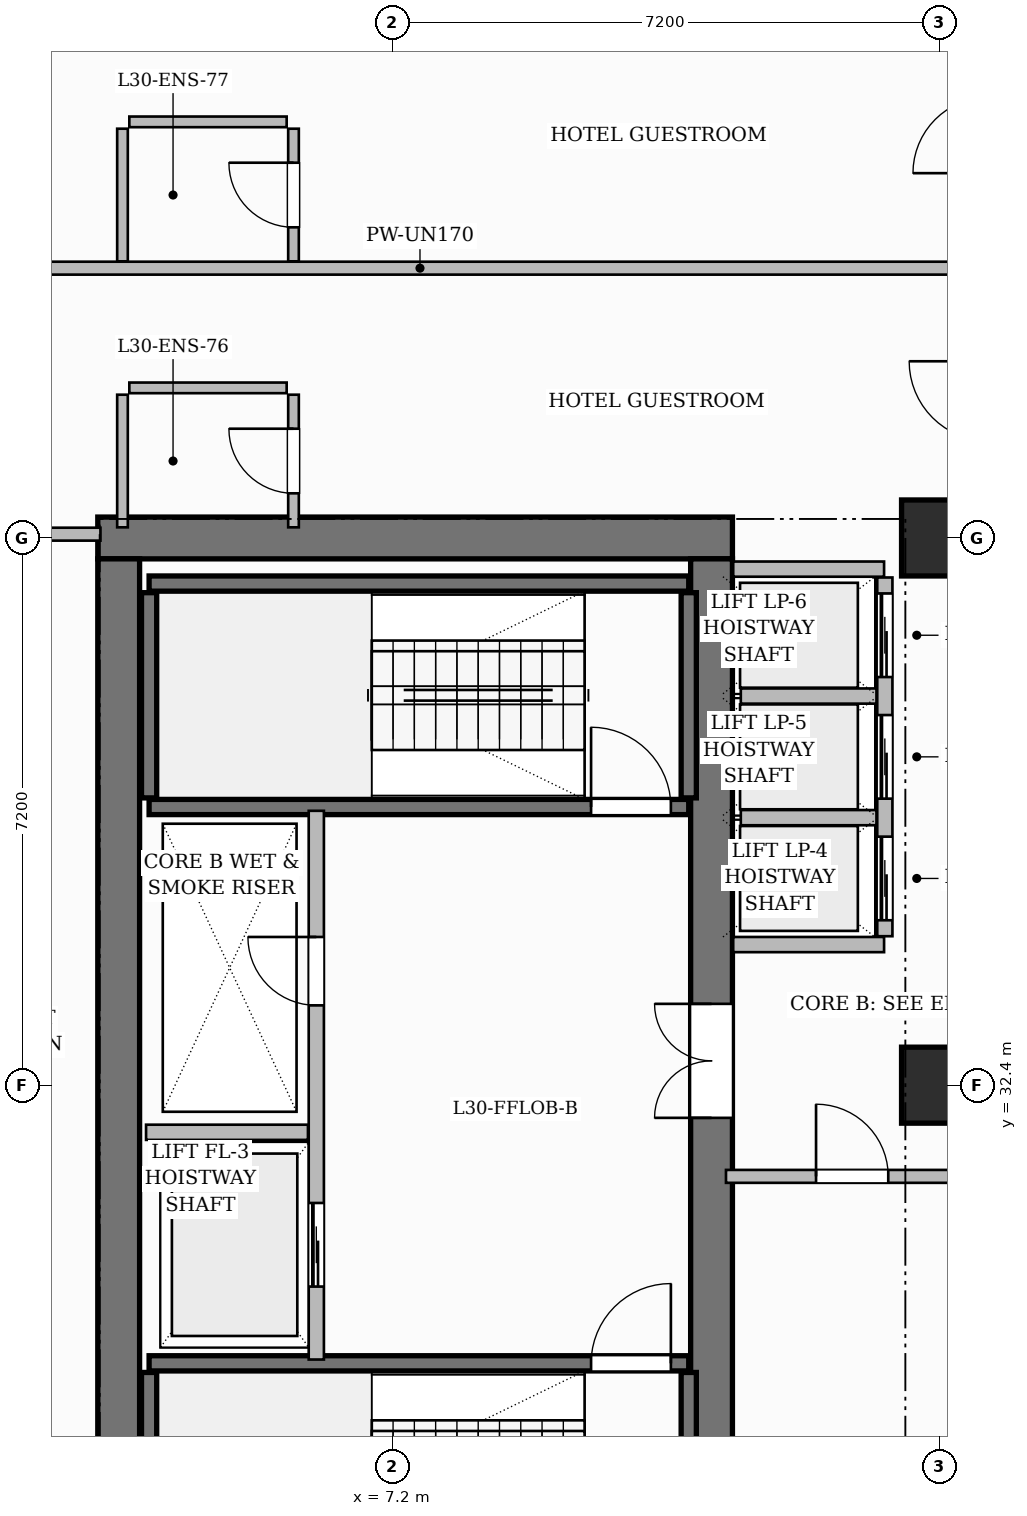
"""IFC4 building model, lengths in metres.
Left out: names, types, materials, properties, quantities, classifications, styles, units other than length and angle.
Written with IfcOpenShell. Run it as: python <this file> out.ifc"""

import sys

from ifc_helpers import new_model, si_unit, direction, frame, frame_2d, origin, origin_2d, place, context, subcontext, project, spatial, rectangle, extrude, source, transform, mapped, element, fill, save


model = new_model("IFC4")
c1 = context("Model", 3, precision=1e-05, world=origin(), true_north=direction((0.0, 1.0)))
c2 = subcontext(c1, "Body", "Model", "MODEL_VIEW")
j1 = project(units=[si_unit("LENGTHUNIT", "METRE"), si_unit("PLANEANGLEUNIT", "RADIAN")], contexts=[c1])
p1 = place(None, origin())
s1 = spatial("IfcSite", under=j1, at=p1, CompositionType="ELEMENT")
p2 = place(p1, origin())
s2 = spatial("IfcBuilding", under=s1, at=p2, CompositionType="ELEMENT")
p3 = place(p2, frame((0.0, 0.0, 122.9)))
s3 = spatial("IfcBuildingStorey", under=s2, at=p3, CompositionType="ELEMENT", Elevation=122.9)
p4 = place(p3, frame((3.325, 39.6, 0.0), z_axis=(0.0, 0.0, 1.0), x_axis=(1.0, 0.0, 0.0)))
e1 = element("IfcWall", 1, at=p4, inside=s3, PredefinedType="SHEAR", context=c2, shape_type="SweptSolid", body=[
    extrude(rectangle(XDim=8.35, YDim=0.55, at=frame_2d((4.175, 0.0))), origin(), (0.0, 0.0, 1.0), 3.7),
])
p5 = place(p3, frame((3.6, 25.475, 0.0), z_axis=(0.0, 0.0, 1.0), x_axis=(0.0, 1.0, 0.0)))
e2 = element("IfcWall", 2, at=p5, inside=s3, PredefinedType="SHEAR", context=c2, shape_type="SweptSolid", body=[
    extrude(rectangle(XDim=13.85, YDim=0.55, at=frame_2d((6.925, 0.0))), origin(), (0.0, 0.0, 1.0), 3.7),
])
p6 = place(p3, frame((11.4, 25.475, 0.0), z_axis=(0.0, 0.0, 1.0), x_axis=(0.0, 1.0, 0.0)))
e3 = element("IfcWall", 3, at=p6, inside=s3, PredefinedType="SHEAR", context=c2, shape_type="SweptSolid", body=[
    extrude(rectangle(XDim=13.85, YDim=0.55, at=frame_2d((6.925, 0.0))), origin(), (0.0, 0.0, 1.0), 3.7),
])
p7 = place(p6, frame((6.495, 0.0, 0.0)))
e4 = element("IfcOpeningElement", 4, at=p7, cuts=e3, PredefinedType="OPENING", context=c2, shape_type="SweptSolid", body=[
    extrude(rectangle(XDim=1.5, YDim=2.2, at=frame_2d((0.75, 1.1))), frame((0.0, 0.285, 0.0), z_axis=(0.0, -1.0, 0.0), x_axis=(1.0, 0.0, 0.0)), (0.0, 0.0, 1.0), 0.57),
])
m1 = source(origin(), c2, "Body", "SweptSolid", [
    extrude(rectangle(XDim=1.0, YDim=1.0, at=origin_2d()), origin(), (0.0, 0.0, 1.0), 3.7),
])
for number, where, z_axis, x_axis in (
    (5, (14.4, 32.4, 0.0), (0.0, 0.0, 1.0), (1.0, 0.0, 0.0)),
    (6, (14.4, 39.6, 0.0), (0.0, 0.0, 1.0), (1.0, 0.0, 0.0)),
):
    element("IfcColumn", number, at=place(p3, frame(where, z_axis=z_axis, x_axis=x_axis)), inside=s3, PredefinedType="COLUMN", context=c2, shape_type="MappedRepresentation", body=[
        mapped(m1, transform((0.0, 0.0, 0.0), scale=1.0)),
    ])
for number, where, z_axis, x_axis in (
    (7, (4.0, 25.92, 0.0), (0.0, 0.0, 1.0), (0.0, 1.0, 0.0)),
    (8, (11.1, 25.92, 0.0), (0.0, 0.0, 1.0), (0.0, 1.0, 0.0)),
):
    element("IfcWall", number, at=place(p3, frame(where, z_axis=z_axis, x_axis=x_axis)), inside=s3, PredefinedType="SHEAR", context=c2, shape_type="SweptSolid", body=[
        extrude(rectangle(XDim=2.7, YDim=0.2, at=frame_2d((1.35, 0.0))), origin(), (0.0, 0.0, 1.0), 3.7),
    ])
p8 = place(p3, frame((4.0, 28.74, 0.0), z_axis=(0.0, 0.0, 1.0), x_axis=(1.0, 0.0, 0.0)))
e9 = element("IfcWall", 9, at=p8, inside=s3, PredefinedType="SHEAR", context=c2, shape_type="SweptSolid", body=[
    extrude(rectangle(XDim=7.1, YDim=0.2, at=frame_2d((3.55, 0.0))), origin(), (0.0, 0.0, 1.0), 3.7),
])
p9 = place(p8, frame((5.815, 0.0, 0.0)))
e10 = element("IfcOpeningElement", 10, at=p9, cuts=e9, PredefinedType="OPENING", context=c2, shape_type="SweptSolid", body=[
    extrude(rectangle(XDim=1.05, YDim=2.2, at=frame_2d((0.525, 1.1))), frame((0.0, 0.11, 0.0), z_axis=(0.0, -1.0, 0.0), x_axis=(1.0, 0.0, 0.0)), (0.0, 0.0, 1.0), 0.22),
])
p10 = place(p3, frame((4.0, 39.0, 0.0), z_axis=(0.0, 0.0, 1.0), x_axis=(1.0, 0.0, 0.0)))
e11 = element("IfcWall", 11, at=p10, inside=s3, PredefinedType="SHEAR", context=c2, shape_type="SweptSolid", body=[
    extrude(rectangle(XDim=7.1, YDim=0.2, at=frame_2d((3.55, 0.0))), origin(), (0.0, 0.0, 1.0), 3.7),
])
for number, where, z_axis, x_axis in (
    (12, (4.0, 36.18, 0.0), (0.0, 0.0, 1.0), (0.0, 1.0, 0.0)),
    (13, (11.1, 36.18, 0.0), (0.0, 0.0, 1.0), (0.0, 1.0, 0.0)),
):
    element("IfcWall", number, at=place(p3, frame(where, z_axis=z_axis, x_axis=x_axis)), inside=s3, PredefinedType="SHEAR", context=c2, shape_type="SweptSolid", body=[
        extrude(rectangle(XDim=2.7, YDim=0.2, at=frame_2d((1.35, 0.0))), origin(), (0.0, 0.0, 1.0), 3.7),
    ])
p11 = place(p3, frame((4.0, 36.06, 0.0), z_axis=(0.0, 0.0, 1.0), x_axis=(1.0, 0.0, 0.0)))
e14 = element("IfcWall", 14, at=p11, inside=s3, PredefinedType="SHEAR", context=c2, shape_type="SweptSolid", body=[
    extrude(rectangle(XDim=7.1, YDim=0.2, at=frame_2d((3.55, 0.0))), origin(), (0.0, 0.0, 1.0), 3.7),
])
p12 = place(p11, frame((5.815, 0.0, 0.0)))
e15 = element("IfcOpeningElement", 15, at=p12, cuts=e14, PredefinedType="OPENING", context=c2, shape_type="SweptSolid", body=[
    extrude(rectangle(XDim=1.05, YDim=2.2, at=frame_2d((0.525, 1.1))), frame((0.0, 0.11, 0.0), z_axis=(0.0, -1.0, 0.0), x_axis=(1.0, 0.0, 0.0)), (0.0, 0.0, 1.0), 0.22),
])
p13 = place(p3, frame((6.2, 28.79, 0.0), z_axis=(0.0, 0.0, 1.0), x_axis=(0.0, 1.0, 0.0)))
e16 = element("IfcWall", 16, at=p13, inside=s3, PredefinedType="PARTITIONING", context=c2, shape_type="SweptSolid", body=[
    extrude(rectangle(XDim=7.22, YDim=0.2, at=frame_2d((3.61, 0.0))), origin(), (0.0, 0.0, 1.0), 3.45),
])
p14 = place(p13, frame((4.66, 0.0, 0.0)))
e17 = element("IfcOpeningElement", 17, at=p14, cuts=e16, PredefinedType="OPENING", context=c2, shape_type="SweptSolid", body=[
    extrude(rectangle(XDim=0.9, YDim=2.1, at=frame_2d((0.45, 1.05))), frame((0.0, 0.11, 0.0), z_axis=(0.0, -1.0, 0.0), x_axis=(1.0, 0.0, 0.0)), (0.0, 0.0, 1.0), 0.22),
])
p15 = place(p13, frame((0.96, 0.0, 0.0)))
e18 = element("IfcOpeningElement", 18, at=p15, cuts=e16, PredefinedType="OPENING", context=c2, shape_type="SweptSolid", body=[
    extrude(rectangle(XDim=1.1, YDim=2.2, at=frame_2d((0.55, 1.1))), frame((0.0, 0.11, 0.0), z_axis=(0.0, -1.0, 0.0), x_axis=(1.0, 0.0, 0.0)), (0.0, 0.0, 1.0), 0.22),
])
p16 = place(p3, frame((3.96, 31.78, 0.0), z_axis=(0.0, 0.0, 1.0), x_axis=(1.0, 0.0, 0.0)))
e19 = element("IfcWall", 19, at=p16, inside=s3, PredefinedType="PARTITIONING", context=c2, shape_type="SweptSolid", body=[
    extrude(rectangle(XDim=2.13, YDim=0.2, at=frame_2d((1.065, 0.0))), origin(), (0.0, 0.0, 1.0), 3.45),
])
for number, where, z_axis, x_axis in (
    (20, (11.685, 34.25, 0.0), (0.0, 0.0, 1.0), (1.0, 0.0, 0.0)),
    (21, (11.685, 39.19, 0.0), (0.0, 0.0, 1.0), (1.0, 0.0, 0.0)),
):
    element("IfcWall", number, at=place(p3, frame(where, z_axis=z_axis, x_axis=x_axis)), inside=s3, PredefinedType="PARTITIONING", context=c2, shape_type="SweptSolid", body=[
        extrude(rectangle(XDim=1.985, YDim=0.2, at=frame_2d((0.992, 0.0))), origin(), (0.0, 0.0, 1.0), 3.45),
    ])
p17 = place(p3, frame((13.68, 34.36, 0.0), z_axis=(0.0, 0.0, 1.0), x_axis=(0.0, 1.0, 0.0)))
e22 = element("IfcWall", 22, at=p17, inside=s3, PredefinedType="PARTITIONING", context=c2, shape_type="SweptSolid", body=[
    extrude(rectangle(XDim=4.72, YDim=0.2, at=frame_2d((2.36, 0.0))), origin(), (0.0, 0.0, 1.0), 3.45),
])
p18 = place(p17, frame((0.21, 0.0, 0.0)))
e23 = element("IfcOpeningElement", 23, at=p18, cuts=e22, PredefinedType="OPENING", context=c2, shape_type="SweptSolid", body=[
    extrude(rectangle(XDim=1.1, YDim=2.2, at=frame_2d((0.55, 1.1))), frame((0.0, 0.11, 0.0), z_axis=(0.0, -1.0, 0.0), x_axis=(1.0, 0.0, 0.0)), (0.0, 0.0, 1.0), 0.22),
])
p19 = place(p17, frame((1.81, 0.0, 0.0)))
e24 = element("IfcOpeningElement", 24, at=p19, cuts=e22, PredefinedType="OPENING", context=c2, shape_type="SweptSolid", body=[
    extrude(rectangle(XDim=1.1, YDim=2.2, at=frame_2d((0.55, 1.1))), frame((0.0, 0.11, 0.0), z_axis=(0.0, -1.0, 0.0), x_axis=(1.0, 0.0, 0.0)), (0.0, 0.0, 1.0), 0.22),
])
p20 = place(p17, frame((3.41, 0.0, 0.0)))
e25 = element("IfcOpeningElement", 25, at=p20, cuts=e22, PredefinedType="OPENING", context=c2, shape_type="SweptSolid", body=[
    extrude(rectangle(XDim=1.1, YDim=2.2, at=frame_2d((0.55, 1.1))), frame((0.0, 0.11, 0.0), z_axis=(0.0, -1.0, 0.0), x_axis=(1.0, 0.0, 0.0)), (0.0, 0.0, 1.0), 0.22),
])
for number, where, z_axis, x_axis in (
    (26, (11.785, 35.92, 0.0), (0.0, 0.0, 1.0), (1.0, 0.0, 0.0)),
    (27, (11.785, 37.52, 0.0), (0.0, 0.0, 1.0), (1.0, 0.0, 0.0)),
):
    element("IfcWall", number, at=place(p3, frame(where, z_axis=z_axis, x_axis=x_axis)), inside=s3, PredefinedType="PARTITIONING", context=c2, shape_type="SweptSolid", body=[
        extrude(rectangle(XDim=1.785, YDim=0.2, at=frame_2d((0.893, 0.0))), origin(), (0.0, 0.0, 1.0), 3.45),
    ])
p21 = place(p3, frame((0.24, 39.65, 0.0), z_axis=(0.0, 0.0, 1.0), x_axis=(1.0, 0.0, 0.0)))
e28 = element("IfcWall", 28, at=p21, inside=s3, PredefinedType="PARTITIONING", context=c2, shape_type="SweptSolid", body=[
    extrude(rectangle(XDim=3.12, YDim=0.17, at=frame_2d((1.56, 0.0))), origin(), (0.0, 0.0, 1.0), 3.45),
])
p22 = place(p21, frame((1.11, 0.0, 0.0)))
e29 = element("IfcOpeningElement", 29, at=p22, cuts=e28, PredefinedType="OPENING", context=c2, shape_type="SweptSolid", body=[
    extrude(rectangle(XDim=0.9, YDim=2.15, at=frame_2d((0.45, 1.075))), frame((0.0, 0.095, 0.0), z_axis=(0.0, -1.0, 0.0), x_axis=(1.0, 0.0, 0.0)), (0.0, 0.0, 1.0), 0.19),
])
p23 = place(p3, frame((0.168, 43.15, 0.0), z_axis=(0.0, 0.0, 1.0), x_axis=(1.0, 0.0, 0.0)))
e30 = element("IfcWall", 30, at=p23, inside=s3, PredefinedType="PARTITIONING", context=c2, shape_type="SweptSolid", body=[
    extrude(rectangle(XDim=14.792, YDim=0.17, at=frame_2d((7.396, 0.0))), origin(), (0.0, 0.0, 1.0), 3.45),
])
p24 = place(p3, frame((3.65, 39.74, 0.0), z_axis=(0.0, 0.0, 1.0), x_axis=(0.0, 1.0, 0.0)))
e31 = element("IfcWall", 31, at=p24, inside=s3, PredefinedType="PARTITIONING", context=c2, shape_type="SweptSolid", body=[
    extrude(rectangle(XDim=1.745, YDim=0.14, at=frame_2d((0.873, 0.0))), origin(), (0.0, 0.0, 1.0), 3.45),
])
p25 = place(p3, frame((3.74, 41.575, 0.0), z_axis=(0.0, 0.0, 1.0), x_axis=(1.0, 0.0, 0.0)))
e32 = element("IfcWall", 32, at=p25, inside=s3, PredefinedType="PARTITIONING", context=c2, shape_type="SweptSolid", body=[
    extrude(rectangle(XDim=2.07, YDim=0.14, at=frame_2d((1.035, 0.0))), origin(), (0.0, 0.0, 1.0), 2.935),
])
p26 = place(p3, frame((5.9, 39.74, 0.0), z_axis=(0.0, 0.0, 1.0), x_axis=(0.0, 1.0, 0.0)))
e33 = element("IfcWall", 33, at=p26, inside=s3, PredefinedType="PARTITIONING", context=c2, shape_type="SweptSolid", body=[
    extrude(rectangle(XDim=1.745, YDim=0.14, at=frame_2d((0.873, 0.0))), origin(), (0.0, 0.0, 1.0), 3.45),
])
p27 = place(p26, frame((0.448, 0.0, 0.0)))
e34 = element("IfcOpeningElement", 34, at=p27, cuts=e33, PredefinedType="OPENING", context=c2, shape_type="SweptSolid", body=[
    extrude(rectangle(XDim=0.85, YDim=2.1, at=frame_2d((0.425, 1.05))), frame((0.0, 0.08, 0.0), z_axis=(0.0, -1.0, 0.0), x_axis=(1.0, 0.0, 0.0)), (0.0, 0.0, 1.0), 0.16),
])
p28 = place(p3, frame((3.65, 43.24, 0.0), z_axis=(0.0, 0.0, 1.0), x_axis=(0.0, 1.0, 0.0)))
e35 = element("IfcWall", 35, at=p28, inside=s3, PredefinedType="PARTITIONING", context=c2, shape_type="SweptSolid", body=[
    extrude(rectangle(XDim=1.745, YDim=0.14, at=frame_2d((0.873, 0.0))), origin(), (0.0, 0.0, 1.0), 3.45),
])
p29 = place(p3, frame((3.74, 45.075, 0.0), z_axis=(0.0, 0.0, 1.0), x_axis=(1.0, 0.0, 0.0)))
e36 = element("IfcWall", 36, at=p29, inside=s3, PredefinedType="PARTITIONING", context=c2, shape_type="SweptSolid", body=[
    extrude(rectangle(XDim=2.07, YDim=0.14, at=frame_2d((1.035, 0.0))), origin(), (0.0, 0.0, 1.0), 3.45),
])
p30 = place(p3, frame((5.9, 43.24, 0.0), z_axis=(0.0, 0.0, 1.0), x_axis=(0.0, 1.0, 0.0)))
e37 = element("IfcWall", 37, at=p30, inside=s3, PredefinedType="PARTITIONING", context=c2, shape_type="SweptSolid", body=[
    extrude(rectangle(XDim=1.745, YDim=0.14, at=frame_2d((0.873, 0.0))), origin(), (0.0, 0.0, 1.0), 3.45),
])
p31 = place(p30, frame((0.448, 0.0, 0.0)))
e38 = element("IfcOpeningElement", 38, at=p31, cuts=e37, PredefinedType="OPENING", context=c2, shape_type="SweptSolid", body=[
    extrude(rectangle(XDim=0.85, YDim=2.1, at=frame_2d((0.425, 1.05))), frame((0.0, 0.08, 0.0), z_axis=(0.0, -1.0, 0.0), x_axis=(1.0, 0.0, 0.0)), (0.0, 0.0, 1.0), 0.16),
])
p32 = place(p3, frame((11.59, 31.2, 0.0), z_axis=(0.0, 0.0, 1.0), x_axis=(1.0, 0.0, 0.0)))
e39 = element("IfcWall", 39, at=p32, inside=s3, PredefinedType="PARTITIONING", context=c2, shape_type="SweptSolid", body=[
    extrude(rectangle(XDim=3.37, YDim=0.17, at=frame_2d((1.685, 0.0))), origin(), (0.0, 0.0, 1.0), 3.45),
])
p33 = place(p32, frame((1.185, 0.0, 0.0)))
e40 = element("IfcOpeningElement", 40, at=p33, cuts=e39, PredefinedType="OPENING", context=c2, shape_type="SweptSolid", body=[
    extrude(rectangle(XDim=0.95, YDim=2.15, at=frame_2d((0.475, 1.075))), frame((0.0, 0.095, 0.0), z_axis=(0.0, -1.0, 0.0), x_axis=(1.0, 0.0, 0.0)), (0.0, 0.0, 1.0), 0.19),
])
m2 = source(origin(), c2, "Body", "SweptSolid", [
    extrude(rectangle(XDim=1.05, YDim=2.2, at=frame_2d((0.525, 1.1))), frame((0.0, 0.025, 0.0), z_axis=(0.0, -1.0, 0.0), x_axis=(1.0, 0.0, 0.0)), (0.0, 0.0, 1.0), 0.05),
])
p34 = place(p9, origin())
e41 = element("IfcDoor", 41, at=p34, inside=s3, OperationType="SINGLE_SWING_RIGHT", PredefinedType="DOOR", context=c2, shape_type="MappedRepresentation", body=[
    mapped(m2, transform((0.0, 0.0, 0.0), scale=1.0)),
])
fill(e10, e41)
p35 = place(p12, origin())
e42 = element("IfcDoor", 42, at=p35, inside=s3, OperationType="SINGLE_SWING_LEFT", PredefinedType="DOOR", context=c2, shape_type="MappedRepresentation", body=[
    mapped(m2, transform((0.0, 0.0, 0.0), scale=1.0)),
])
fill(e15, e42)
m3 = source(origin(), c2, "Body", "SweptSolid", [
    extrude(rectangle(XDim=0.9, YDim=2.1, at=frame_2d((0.45, 1.05))), frame((0.0, 0.025, 0.0), z_axis=(0.0, -1.0, 0.0), x_axis=(1.0, 0.0, 0.0)), (0.0, 0.0, 1.0), 0.05),
])
p36 = place(p14, origin())
e43 = element("IfcDoor", 43, at=p36, inside=s3, OperationType="SINGLE_SWING_RIGHT", PredefinedType="DOOR", context=c2, shape_type="MappedRepresentation", body=[
    mapped(m3, transform((0.0, 0.0, 0.0), scale=1.0)),
])
fill(e17, e43)
m4 = source(origin(), c2, "Body", "SweptSolid", [
    extrude(rectangle(XDim=1.5, YDim=2.2, at=frame_2d((0.75, 1.1))), frame((0.0, 0.025, 0.0), z_axis=(0.0, -1.0, 0.0), x_axis=(1.0, 0.0, 0.0)), (0.0, 0.0, 1.0), 0.05),
])
p37 = place(p7, origin())
e44 = element("IfcDoor", 44, at=p37, inside=s3, OperationType="DOUBLE_DOOR_SINGLE_SWING", PredefinedType="DOOR", context=c2, shape_type="MappedRepresentation", body=[
    mapped(m4, transform((0.0, 0.0, 0.0), scale=1.0)),
])
fill(e4, e44)
m5 = source(origin(), c2, "Body", "SweptSolid", [
    extrude(rectangle(XDim=0.85, YDim=2.1, at=frame_2d((0.425, 1.05))), frame((0.0, 0.025, 0.0), z_axis=(0.0, -1.0, 0.0), x_axis=(1.0, 0.0, 0.0)), (0.0, 0.0, 1.0), 0.05),
])
p38 = place(p27, origin())
e45 = element("IfcDoor", 45, at=p38, inside=s3, OperationType="SINGLE_SWING_RIGHT", PredefinedType="DOOR", context=c2, shape_type="MappedRepresentation", body=[
    mapped(m5, transform((0.0, 0.0, 0.0), scale=1.0)),
])
fill(e34, e45)
p39 = place(p31, origin())
e46 = element("IfcDoor", 46, at=p39, inside=s3, OperationType="SINGLE_SWING_RIGHT", PredefinedType="DOOR", context=c2, shape_type="MappedRepresentation", body=[
    mapped(m5, transform((0.0, 0.0, 0.0), scale=1.0)),
])
fill(e38, e46)
m6 = source(origin(), c2, "Body", "SweptSolid", [
    extrude(rectangle(XDim=0.95, YDim=2.15, at=frame_2d((0.475, 1.075))), frame((0.0, 0.025, 0.0), z_axis=(0.0, -1.0, 0.0), x_axis=(1.0, 0.0, 0.0)), (0.0, 0.0, 1.0), 0.05),
])
p40 = place(p33, origin())
e47 = element("IfcDoor", 47, at=p40, inside=s3, OperationType="SINGLE_SWING_LEFT", PredefinedType="DOOR", context=c2, shape_type="MappedRepresentation", body=[
    mapped(m6, transform((0.0, 0.0, 0.0), scale=1.0)),
])
fill(e40, e47)
m7 = source(origin(), c2, "Body", "SweptSolid", [
    extrude(rectangle(XDim=1.1, YDim=2.2, at=frame_2d((0.55, 1.1))), frame((0.0, 0.025, 0.0), z_axis=(0.0, -1.0, 0.0), x_axis=(1.0, 0.0, 0.0)), (0.0, 0.0, 1.0), 0.05),
])
p41 = place(p15, origin())
e48 = element("IfcDoor", 48, at=p41, inside=s3, OperationType="SLIDING_TO_LEFT", PredefinedType="DOOR", context=c2, shape_type="MappedRepresentation", body=[
    mapped(m7, transform((0.0, 0.0, 0.0), scale=1.0)),
])
fill(e18, e48)
p42 = place(p18, origin())
e49 = element("IfcDoor", 49, at=p42, inside=s3, OperationType="SLIDING_TO_LEFT", PredefinedType="DOOR", context=c2, shape_type="MappedRepresentation", body=[
    mapped(m7, transform((0.0, 0.0, 0.0), scale=1.0)),
])
fill(e23, e49)
p43 = place(p19, origin())
e50 = element("IfcDoor", 50, at=p43, inside=s3, OperationType="SLIDING_TO_LEFT", PredefinedType="DOOR", context=c2, shape_type="MappedRepresentation", body=[
    mapped(m7, transform((0.0, 0.0, 0.0), scale=1.0)),
])
fill(e24, e50)
p44 = place(p20, origin())
e51 = element("IfcDoor", 51, at=p44, inside=s3, OperationType="SLIDING_TO_LEFT", PredefinedType="DOOR", context=c2, shape_type="MappedRepresentation", body=[
    mapped(m7, transform((0.0, 0.0, 0.0), scale=1.0)),
])
fill(e25, e51)
save(model, sys.argv[1])
